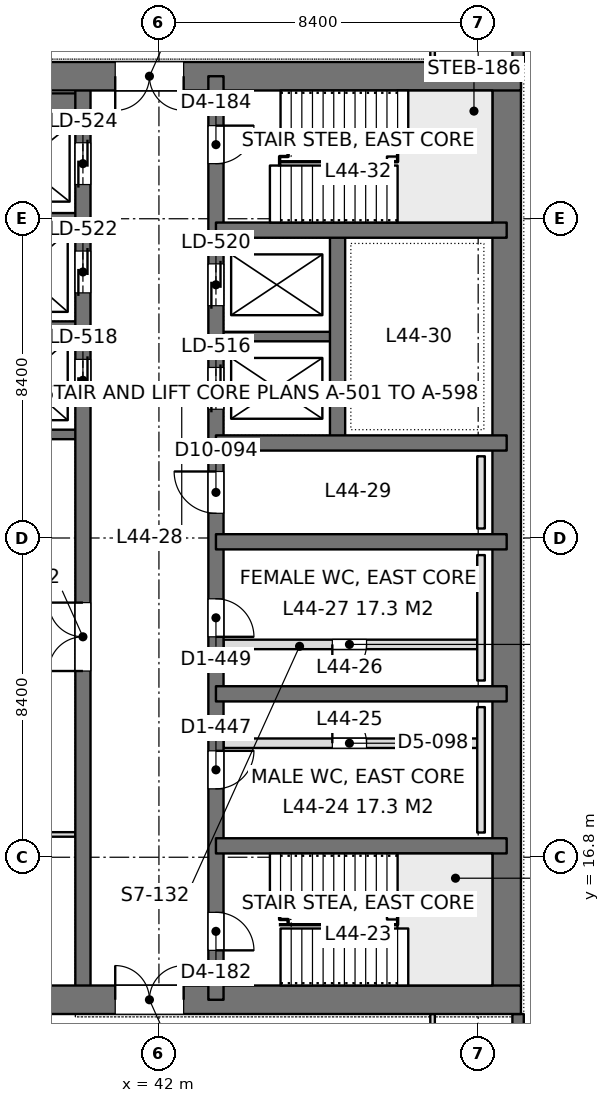
"""IFC4 building model, lengths in metres.
Left out: names, types, materials, properties, quantities, classifications, styles, units other than length and angle.
Written with IfcOpenShell. Run it as: python <this file> out.ifc"""

import sys

from ifc_helpers import new_model, si_unit, direction, frame, frame_2d, origin, place, context, subcontext, project, spatial, rectangle, extrude, element, fill, save


model = new_model("IFC4")
c1 = context("Model", 3, precision=1e-05, world=origin(), true_north=direction((0.0, 1.0)))
c2 = subcontext(c1, "Body", "Model", "MODEL_VIEW")
j1 = project(units=[si_unit("LENGTHUNIT", "METRE"), si_unit("PLANEANGLEUNIT", "RADIAN")], contexts=[c1])
p1 = place(None, origin())
s1 = spatial("IfcSite", under=j1, at=p1, CompositionType="ELEMENT")
p2 = place(p1, origin())
s2 = spatial("IfcBuilding", under=s1, at=p2, CompositionType="ELEMENT")
p3 = place(p2, frame((0.0, 0.0, 194.4)))
s3 = spatial("IfcBuildingStorey", under=s2, at=p3, CompositionType="ELEMENT", Elevation=194.4)
p4 = place(p3, frame((33.675, 13.05, 0.0), z_axis=(0.0, 0.0, 1.0), x_axis=(1.0, 0.0, 0.0)))
e1 = element("IfcWall", 1, at=p4, inside=s3, PredefinedType="SHEAR", context=c2, shape_type="SweptSolid", body=[
    extrude(rectangle(XDim=17.85, YDim=0.75, at=frame_2d((8.925, 0.0))), origin(), (0.0, 0.0, 1.0), 4.2),
])
p5 = place(p4, frame((7.175, 0.0, 0.0)))
e2 = element("IfcOpeningElement", 2, at=p5, cuts=e1, PredefinedType="OPENING", context=c2, shape_type="SweptSolid", body=[
    extrude(rectangle(XDim=1.8, YDim=2.4, at=frame_2d((0.9, 1.2))), frame((0.0, 0.385, 0.0), z_axis=(0.0, -1.0, 0.0), x_axis=(1.0, 0.0, 0.0)), (0.0, 0.0, 1.0), 0.77),
])
p6 = place(p3, frame((33.675, 37.35, 0.0), z_axis=(0.0, 0.0, 1.0), x_axis=(1.0, 0.0, 0.0)))
e3 = element("IfcWall", 3, at=p6, inside=s3, PredefinedType="SHEAR", context=c2, shape_type="SweptSolid", body=[
    extrude(rectangle(XDim=17.85, YDim=0.75, at=frame_2d((8.925, 0.0))), origin(), (0.0, 0.0, 1.0), 4.2),
])
p7 = place(p6, frame((7.175, 0.0, 0.0)))
e4 = element("IfcOpeningElement", 4, at=p7, cuts=e3, PredefinedType="OPENING", context=c2, shape_type="SweptSolid", body=[
    extrude(rectangle(XDim=1.8, YDim=2.4, at=frame_2d((0.9, 1.2))), frame((0.0, 0.385, 0.0), z_axis=(0.0, -1.0, 0.0), x_axis=(1.0, 0.0, 0.0)), (0.0, 0.0, 1.0), 0.77),
])
p8 = place(p3, frame((51.15, 13.05, 0.0), z_axis=(0.0, 0.0, 1.0), x_axis=(0.0, 1.0, 0.0)))
e5 = element("IfcWall", 5, at=p8, inside=s3, PredefinedType="SHEAR", context=c2, shape_type="SweptSolid", body=[
    extrude(rectangle(XDim=24.3, YDim=0.75, at=frame_2d((12.15, 0.0))), origin(), (0.0, 0.0, 1.0), 4.2),
])
p9 = place(p3, frame((43.5, 13.05, 0.0), z_axis=(0.0, 0.0, 1.0), x_axis=(0.0, 1.0, 0.0)))
e6 = element("IfcWall", 6, at=p9, inside=s3, PredefinedType="SHEAR", context=c2, shape_type="SweptSolid", body=[
    extrude(rectangle(XDim=24.3, YDim=0.4, at=frame_2d((12.15, 0.0))), origin(), (0.0, 0.0, 1.0), 4.2),
])
p10 = place(p9, frame((1.3, 0.0, 0.0)))
e7 = element("IfcOpeningElement", 7, at=p10, cuts=e6, PredefinedType="OPENING", context=c2, shape_type="SweptSolid", body=[
    extrude(rectangle(XDim=1.0, YDim=2.2, at=frame_2d((0.5, 1.1))), frame((0.0, 0.21, 0.0), z_axis=(0.0, -1.0, 0.0), x_axis=(1.0, 0.0, 0.0)), (0.0, 0.0, 1.0), 0.42),
])
p11 = place(p9, frame((22.0, 0.0, 0.0)))
e8 = element("IfcOpeningElement", 8, at=p11, cuts=e6, PredefinedType="OPENING", context=c2, shape_type="SweptSolid", body=[
    extrude(rectangle(XDim=1.0, YDim=2.2, at=frame_2d((0.5, 1.1))), frame((0.0, 0.21, 0.0), z_axis=(0.0, -1.0, 0.0), x_axis=(1.0, 0.0, 0.0)), (0.0, 0.0, 1.0), 0.42),
])
p12 = place(p9, frame((5.55, 0.0, 0.0)))
e9 = element("IfcOpeningElement", 9, at=p12, cuts=e6, PredefinedType="OPENING", context=c2, shape_type="SweptSolid", body=[
    extrude(rectangle(XDim=1.0, YDim=2.2, at=frame_2d((0.5, 1.1))), frame((0.0, 0.21, 0.0), z_axis=(0.0, -1.0, 0.0), x_axis=(1.0, 0.0, 0.0)), (0.0, 0.0, 1.0), 0.42),
])
p13 = place(p9, frame((9.55, 0.0, 0.0)))
e10 = element("IfcOpeningElement", 10, at=p13, cuts=e6, PredefinedType="OPENING", context=c2, shape_type="SweptSolid", body=[
    extrude(rectangle(XDim=1.0, YDim=2.2, at=frame_2d((0.5, 1.1))), frame((0.0, 0.21, 0.0), z_axis=(0.0, -1.0, 0.0), x_axis=(1.0, 0.0, 0.0)), (0.0, 0.0, 1.0), 0.42),
])
p14 = place(p9, frame((12.8, 0.0, 0.0)))
e11 = element("IfcOpeningElement", 11, at=p14, cuts=e6, PredefinedType="OPENING", context=c2, shape_type="SweptSolid", body=[
    extrude(rectangle(XDim=1.1, YDim=2.2, at=frame_2d((0.55, 1.1))), frame((0.0, 0.21, 0.0), z_axis=(0.0, -1.0, 0.0), x_axis=(1.0, 0.0, 0.0)), (0.0, 0.0, 1.0), 0.42),
])
p15 = place(p9, frame((15.538, 0.0, 0.0)))
e12 = element("IfcOpeningElement", 12, at=p15, cuts=e6, PredefinedType="OPENING", context=c2, shape_type="SweptSolid", body=[
    extrude(rectangle(XDim=1.1, YDim=2.2, at=frame_2d((0.55, 1.1))), frame((0.0, 0.21, 0.0), z_axis=(0.0, -1.0, 0.0), x_axis=(1.0, 0.0, 0.0)), (0.0, 0.0, 1.0), 0.42),
])
p16 = place(p9, frame((18.262, 0.0, 0.0)))
e13 = element("IfcOpeningElement", 13, at=p16, cuts=e6, PredefinedType="OPENING", context=c2, shape_type="SweptSolid", body=[
    extrude(rectangle(XDim=1.1, YDim=2.2, at=frame_2d((0.55, 1.1))), frame((0.0, 0.21, 0.0), z_axis=(0.0, -1.0, 0.0), x_axis=(1.0, 0.0, 0.0)), (0.0, 0.0, 1.0), 0.42),
])
p17 = place(p3, frame((40.0, 13.05, 0.0), z_axis=(0.0, 0.0, 1.0), x_axis=(0.0, 1.0, 0.0)))
e14 = element("IfcWall", 14, at=p17, inside=s3, PredefinedType="SHEAR", context=c2, shape_type="SweptSolid", body=[
    extrude(rectangle(XDim=24.3, YDim=0.4, at=frame_2d((12.15, 0.0))), origin(), (0.0, 0.0, 1.0), 4.2),
])
p18 = place(p17, frame((15.75, 0.0, 0.0)))
e15 = element("IfcOpeningElement", 15, at=p18, cuts=e14, PredefinedType="OPENING", context=c2, shape_type="SweptSolid", body=[
    extrude(rectangle(XDim=1.1, YDim=2.2, at=frame_2d((0.55, 1.1))), frame((0.0, 0.21, 0.0), z_axis=(0.0, -1.0, 0.0), x_axis=(1.0, 0.0, 0.0)), (0.0, 0.0, 1.0), 0.42),
])
p19 = place(p17, frame((18.6, 0.0, 0.0)))
e16 = element("IfcOpeningElement", 16, at=p19, cuts=e14, PredefinedType="OPENING", context=c2, shape_type="SweptSolid", body=[
    extrude(rectangle(XDim=1.1, YDim=2.2, at=frame_2d((0.55, 1.1))), frame((0.0, 0.21, 0.0), z_axis=(0.0, -1.0, 0.0), x_axis=(1.0, 0.0, 0.0)), (0.0, 0.0, 1.0), 0.42),
])
p20 = place(p17, frame((21.45, 0.0, 0.0)))
e17 = element("IfcOpeningElement", 17, at=p20, cuts=e14, PredefinedType="OPENING", context=c2, shape_type="SweptSolid", body=[
    extrude(rectangle(XDim=1.1, YDim=2.2, at=frame_2d((0.55, 1.1))), frame((0.0, 0.21, 0.0), z_axis=(0.0, -1.0, 0.0), x_axis=(1.0, 0.0, 0.0)), (0.0, 0.0, 1.0), 0.42),
])
p21 = place(p17, frame((8.65, 0.0, 0.0)))
e18 = element("IfcOpeningElement", 18, at=p21, cuts=e14, PredefinedType="OPENING", context=c2, shape_type="SweptSolid", body=[
    extrude(rectangle(XDim=1.8, YDim=2.4, at=frame_2d((0.9, 1.2))), frame((0.0, 0.21, 0.0), z_axis=(0.0, -1.0, 0.0), x_axis=(1.0, 0.0, 0.0)), (0.0, 0.0, 1.0), 0.42),
])
for number, where, z_axis, x_axis in (
    (19, (51.15, 17.1, 0.0), (0.0, 0.0, 1.0), (-1.0, 0.0, 0.0)),
    (20, (51.15, 21.1, 0.0), (0.0, 0.0, 1.0), (-1.0, 0.0, 0.0)),
    (21, (51.15, 25.1, 0.0), (0.0, 0.0, 1.0), (-1.0, 0.0, 0.0)),
    (22, (51.15, 27.7, 0.0), (0.0, 0.0, 1.0), (-1.0, 0.0, 0.0)),
    (23, (51.15, 33.3, 0.0), (0.0, 0.0, 1.0), (-1.0, 0.0, 0.0)),
):
    element("IfcWall", number, at=place(p3, frame(where, z_axis=z_axis, x_axis=x_axis)), inside=s3, PredefinedType="SHEAR", context=c2, shape_type="SweptSolid", body=[
        extrude(rectangle(XDim=7.65, YDim=0.4, at=frame_2d((3.825, 0.0))), origin(), (0.0, 0.0, 1.0), 4.2),
    ])
p22 = place(p3, frame((46.7, 27.7, 0.0), z_axis=(0.0, 0.0, 1.0), x_axis=(0.0, 1.0, 0.0)))
e24 = element("IfcWall", 24, at=p22, inside=s3, PredefinedType="SHEAR", context=c2, shape_type="SweptSolid", body=[
    extrude(rectangle(XDim=5.6, YDim=0.4, at=frame_2d((2.8, 0.0))), origin(), (0.0, 0.0, 1.0), 4.2),
])
p23 = place(p3, frame((46.7, 30.5, 0.0), z_axis=(0.0, 0.0, 1.0), x_axis=(-1.0, 0.0, 0.0)))
e25 = element("IfcWall", 25, at=p23, inside=s3, PredefinedType="SHEAR", context=c2, shape_type="SweptSolid", body=[
    extrude(rectangle(XDim=3.2, YDim=0.25, at=frame_2d((1.6, 0.0))), origin(), (0.0, 0.0, 1.0), 4.2),
])
p24 = place(p3, frame((40.0, 27.925, 0.0), z_axis=(0.0, 0.0, 1.0), x_axis=(-1.0, 0.0, 0.0)))
e26 = element("IfcWall", 26, at=p24, inside=s3, PredefinedType="SHEAR", context=c2, shape_type="SweptSolid", body=[
    extrude(rectangle(XDim=5.95, YDim=0.25, at=frame_2d((2.975, 0.0))), origin(), (0.0, 0.0, 1.0), 4.2),
])
for number, where, z_axis, x_axis in (
    (27, (40.0, 30.775, 0.0), (0.0, 0.0, 1.0), (-1.0, 0.0, 0.0)),
    (28, (40.0, 33.625, 0.0), (0.0, 0.0, 1.0), (-1.0, 0.0, 0.0)),
):
    element("IfcWall", number, at=place(p3, frame(where, z_axis=z_axis, x_axis=x_axis)), inside=s3, PredefinedType="SHEAR", context=c2, shape_type="SweptSolid", body=[
        extrude(rectangle(XDim=3.2, YDim=0.25, at=frame_2d((1.6, 0.0))), origin(), (0.0, 0.0, 1.0), 4.2),
    ])
p25 = place(p3, frame((40.0, 36.625, 0.0), z_axis=(0.0, 0.0, 1.0), x_axis=(-1.0, 0.0, 0.0)))
e29 = element("IfcWall", 29, at=p25, inside=s3, PredefinedType="SHEAR", context=c2, shape_type="SweptSolid", body=[
    extrude(rectangle(XDim=3.2, YDim=0.55, at=frame_2d((1.6, 0.0))), origin(), (0.0, 0.0, 1.0), 4.2),
])
p26 = place(p3, frame((51.45, 42.0, 0.0), z_axis=(0.0, 0.0, 1.0), x_axis=(0.0, -1.0, 0.0)))
e30 = element("IfcWall", 30, at=p26, inside=s3, PredefinedType="SOLIDWALL", context=c2, shape_type="SweptSolid", body=[
    extrude(rectangle(XDim=4.275, YDim=0.3, at=frame_2d((2.137, 0.0))), origin(), (0.0, 0.0, 1.0), 4.05),
])
p27 = place(p26, frame((0.938, 0.0, 0.9)))
e31 = element("IfcOpeningElement", 31, at=p27, cuts=e30, PredefinedType="OPENING", context=c2, shape_type="SweptSolid", body=[
    extrude(rectangle(XDim=2.4, YDim=1.9, at=frame_2d((1.2, 0.95))), frame((0.0, 0.16, 0.0), z_axis=(0.0, -1.0, 0.0), x_axis=(1.0, 0.0, 0.0)), (0.0, 0.0, 1.0), 0.32),
])
p28 = place(p3, frame((51.45, 12.675, 0.0), z_axis=(0.0, 0.0, 1.0), x_axis=(0.0, -1.0, 0.0)))
e32 = element("IfcWall", 32, at=p28, inside=s3, PredefinedType="SOLIDWALL", context=c2, shape_type="SweptSolid", body=[
    extrude(rectangle(XDim=4.275, YDim=0.3, at=frame_2d((2.138, 0.0))), origin(), (0.0, 0.0, 1.0), 4.05),
])
p29 = place(p28, frame((0.938, 0.0, 0.9)))
e33 = element("IfcOpeningElement", 33, at=p29, cuts=e32, PredefinedType="OPENING", context=c2, shape_type="SweptSolid", body=[
    extrude(rectangle(XDim=2.4, YDim=1.9, at=frame_2d((1.2, 0.95))), frame((0.0, 0.16, 0.0), z_axis=(0.0, -1.0, 0.0), x_axis=(1.0, 0.0, 0.0)), (0.0, 0.0, 1.0), 0.32),
])
p30 = place(p3, frame((33.898, 17.4, 0.0), z_axis=(0.0, 0.0, 1.0), x_axis=(1.0, 0.0, 0.0)))
e34 = element("IfcWall", 34, at=p30, inside=s3, PredefinedType="PARTITIONING", context=c2, shape_type="SweptSolid", body=[
    extrude(rectangle(XDim=5.904, YDim=0.12, at=frame_2d((2.952, 0.0))), origin(), (0.0, 0.0, 1.0), 3.55),
])
p31 = place(p3, frame((49.2, 10.7, 0.0), z_axis=(0.0, 0.0, 1.0), x_axis=(0.0, 1.0, 0.0)))
e35 = element("IfcWall", 35, at=p31, inside=s3, PredefinedType="PARTITIONING", context=c2, shape_type="SweptSolid", body=[
    extrude(rectangle(XDim=1.976, YDim=0.12, at=frame_2d((0.988, 0.0))), origin(), (0.0, 0.0, 1.0), 4.05),
])
p32 = place(p3, frame((49.2, 37.724, 0.0), z_axis=(0.0, 0.0, 1.0), x_axis=(0.0, 1.0, 0.0)))
e36 = element("IfcWall", 36, at=p32, inside=s3, PredefinedType="PARTITIONING", context=c2, shape_type="SweptSolid", body=[
    extrude(rectangle(XDim=1.976, YDim=0.12, at=frame_2d((0.988, 0.0))), origin(), (0.0, 0.0, 1.0), 4.05),
])
p33 = place(p3, frame((43.7, 22.4, 0.0), z_axis=(0.0, 0.0, 1.0), x_axis=(1.0, 0.0, 0.0)))
e37 = element("IfcWall", 37, at=p33, inside=s3, PredefinedType="PARTITIONING", context=c2, shape_type="SweptSolid", body=[
    extrude(rectangle(XDim=6.675, YDim=0.25, at=frame_2d((3.337, 0.0))), origin(), (0.0, 0.0, 1.0), 4.0),
])
p34 = place(p33, frame((2.863, 0.0, 0.0)))
e38 = element("IfcOpeningElement", 38, at=p34, cuts=e37, PredefinedType="OPENING", context=c2, shape_type="SweptSolid", body=[
    extrude(rectangle(XDim=0.9, YDim=2.2, at=frame_2d((0.45, 1.1))), frame((0.0, 0.135, 0.0), z_axis=(0.0, -1.0, 0.0), x_axis=(1.0, 0.0, 0.0)), (0.0, 0.0, 1.0), 0.27),
])
p35 = place(p3, frame((43.7, 19.8, 0.0), z_axis=(0.0, 0.0, 1.0), x_axis=(1.0, 0.0, 0.0)))
e39 = element("IfcWall", 39, at=p35, inside=s3, PredefinedType="PARTITIONING", context=c2, shape_type="SweptSolid", body=[
    extrude(rectangle(XDim=6.675, YDim=0.25, at=frame_2d((3.337, 0.0))), origin(), (0.0, 0.0, 1.0), 4.0),
])
p36 = place(p35, frame((2.863, 0.0, 0.0)))
e40 = element("IfcOpeningElement", 40, at=p36, cuts=e39, PredefinedType="OPENING", context=c2, shape_type="SweptSolid", body=[
    extrude(rectangle(XDim=0.9, YDim=2.2, at=frame_2d((0.45, 1.1))), frame((0.0, 0.135, 0.0), z_axis=(0.0, -1.0, 0.0), x_axis=(1.0, 0.0, 0.0)), (0.0, 0.0, 1.0), 0.27),
])
for number, where, z_axis, x_axis in (
    (41, (50.475, 17.45, 0.0), (0.0, 0.0, 1.0), (0.0, 1.0, 0.0)),
    (42, (50.475, 21.45, 0.0), (0.0, 0.0, 1.0), (0.0, 1.0, 0.0)),
):
    element("IfcWall", number, at=place(p3, frame(where, z_axis=z_axis, x_axis=x_axis)), inside=s3, PredefinedType="PLUMBINGWALL", context=c2, shape_type="SweptSolid", body=[
        extrude(rectangle(XDim=3.3, YDim=0.2, at=frame_2d((1.65, 0.0))), origin(), (0.0, 0.0, 1.0), 1.2),
    ])
p37 = place(p3, frame((50.475, 25.45, 0.0), z_axis=(0.0, 0.0, 1.0), x_axis=(0.0, 1.0, 0.0)))
e43 = element("IfcWall", 43, at=p37, inside=s3, PredefinedType="PLUMBINGWALL", context=c2, shape_type="SweptSolid", body=[
    extrude(rectangle(XDim=1.9, YDim=0.2, at=frame_2d((0.95, 0.0))), origin(), (0.0, 0.0, 1.0), 1.2),
])
p38 = place(p5, origin())
e44 = element("IfcDoor", 44, at=p38, inside=s3, OperationType="DOUBLE_DOOR_SINGLE_SWING", PredefinedType="DOOR", context=c2, shape_type="SweptSolid", body=[
    extrude(rectangle(XDim=1.8, YDim=2.4, at=frame_2d((0.9, 1.2))), frame((0.0, 0.025, 0.0), z_axis=(0.0, -1.0, 0.0), x_axis=(1.0, 0.0, 0.0)), (0.0, 0.0, 1.0), 0.05),
])
fill(e2, e44)
p39 = place(p7, frame((1.8, 0.0, 0.0), z_axis=(0.0, 0.0, 1.0), x_axis=(-1.0, 0.0, 0.0)))
e45 = element("IfcDoor", 45, at=p39, inside=s3, OperationType="DOUBLE_DOOR_SINGLE_SWING", PredefinedType="DOOR", context=c2, shape_type="SweptSolid", body=[
    extrude(rectangle(XDim=1.8, YDim=2.4, at=frame_2d((0.9, 1.2))), frame((0.0, 0.025, 0.0), z_axis=(0.0, -1.0, 0.0), x_axis=(1.0, 0.0, 0.0)), (0.0, 0.0, 1.0), 0.05),
])
fill(e4, e45)
p40 = place(p10, frame((1.0, 0.0, 0.0), z_axis=(0.0, 0.0, 1.0), x_axis=(-1.0, 0.0, 0.0)))
e46 = element("IfcDoor", 46, at=p40, inside=s3, OperationType="SINGLE_SWING_RIGHT", PredefinedType="DOOR", context=c2, shape_type="SweptSolid", body=[
    extrude(rectangle(XDim=1.0, YDim=2.2, at=frame_2d((0.5, 1.1))), frame((0.0, 0.025, 0.0), z_axis=(0.0, -1.0, 0.0), x_axis=(1.0, 0.0, 0.0)), (0.0, 0.0, 1.0), 0.05),
])
fill(e7, e46)
p41 = place(p11, frame((1.0, 0.0, 0.0), z_axis=(0.0, 0.0, 1.0), x_axis=(-1.0, 0.0, 0.0)))
e47 = element("IfcDoor", 47, at=p41, inside=s3, OperationType="SINGLE_SWING_LEFT", PredefinedType="DOOR", context=c2, shape_type="SweptSolid", body=[
    extrude(rectangle(XDim=1.0, YDim=2.2, at=frame_2d((0.5, 1.1))), frame((0.0, 0.025, 0.0), z_axis=(0.0, -1.0, 0.0), x_axis=(1.0, 0.0, 0.0)), (0.0, 0.0, 1.0), 0.05),
])
fill(e8, e47)
p42 = place(p12, frame((1.0, 0.0, 0.0), z_axis=(0.0, 0.0, 1.0), x_axis=(-1.0, 0.0, 0.0)))
e48 = element("IfcDoor", 48, at=p42, inside=s3, OperationType="SINGLE_SWING_LEFT", PredefinedType="DOOR", context=c2, shape_type="SweptSolid", body=[
    extrude(rectangle(XDim=1.0, YDim=2.2, at=frame_2d((0.5, 1.1))), frame((0.0, 0.025, 0.0), z_axis=(0.0, -1.0, 0.0), x_axis=(1.0, 0.0, 0.0)), (0.0, 0.0, 1.0), 0.05),
])
fill(e9, e48)
p43 = place(p13, frame((1.0, 0.0, 0.0), z_axis=(0.0, 0.0, 1.0), x_axis=(-1.0, 0.0, 0.0)))
e49 = element("IfcDoor", 49, at=p43, inside=s3, OperationType="SINGLE_SWING_RIGHT", PredefinedType="DOOR", context=c2, shape_type="SweptSolid", body=[
    extrude(rectangle(XDim=1.0, YDim=2.2, at=frame_2d((0.5, 1.1))), frame((0.0, 0.025, 0.0), z_axis=(0.0, -1.0, 0.0), x_axis=(1.0, 0.0, 0.0)), (0.0, 0.0, 1.0), 0.05),
])
fill(e10, e49)
p44 = place(p14, origin())
e50 = element("IfcDoor", 50, at=p44, inside=s3, OperationType="SINGLE_SWING_RIGHT", PredefinedType="DOOR", context=c2, shape_type="SweptSolid", body=[
    extrude(rectangle(XDim=1.1, YDim=2.2, at=frame_2d((0.55, 1.1))), frame((0.0, 0.025, 0.0), z_axis=(0.0, -1.0, 0.0), x_axis=(1.0, 0.0, 0.0)), (0.0, 0.0, 1.0), 0.05),
])
fill(e11, e50)
p45 = place(p18, origin())
e51 = element("IfcDoor", 51, at=p45, inside=s3, OperationType="DOUBLE_DOOR_SLIDING", PredefinedType="DOOR", context=c2, shape_type="SweptSolid", body=[
    extrude(rectangle(XDim=1.1, YDim=2.2, at=frame_2d((0.55, 1.1))), frame((0.0, 0.025, 0.0), z_axis=(0.0, -1.0, 0.0), x_axis=(1.0, 0.0, 0.0)), (0.0, 0.0, 1.0), 0.05),
])
fill(e15, e51)
p46 = place(p19, origin())
e52 = element("IfcDoor", 52, at=p46, inside=s3, OperationType="DOUBLE_DOOR_SLIDING", PredefinedType="DOOR", context=c2, shape_type="SweptSolid", body=[
    extrude(rectangle(XDim=1.1, YDim=2.2, at=frame_2d((0.55, 1.1))), frame((0.0, 0.025, 0.0), z_axis=(0.0, -1.0, 0.0), x_axis=(1.0, 0.0, 0.0)), (0.0, 0.0, 1.0), 0.05),
])
fill(e16, e52)
p47 = place(p20, origin())
e53 = element("IfcDoor", 53, at=p47, inside=s3, OperationType="DOUBLE_DOOR_SLIDING", PredefinedType="DOOR", context=c2, shape_type="SweptSolid", body=[
    extrude(rectangle(XDim=1.1, YDim=2.2, at=frame_2d((0.55, 1.1))), frame((0.0, 0.025, 0.0), z_axis=(0.0, -1.0, 0.0), x_axis=(1.0, 0.0, 0.0)), (0.0, 0.0, 1.0), 0.05),
])
fill(e17, e53)
p48 = place(p15, origin())
e54 = element("IfcDoor", 54, at=p48, inside=s3, OperationType="DOUBLE_DOOR_SLIDING", PredefinedType="DOOR", context=c2, shape_type="SweptSolid", body=[
    extrude(rectangle(XDim=1.1, YDim=2.2, at=frame_2d((0.55, 1.1))), frame((0.0, 0.025, 0.0), z_axis=(0.0, -1.0, 0.0), x_axis=(1.0, 0.0, 0.0)), (0.0, 0.0, 1.0), 0.05),
])
fill(e12, e54)
p49 = place(p16, origin())
e55 = element("IfcDoor", 55, at=p49, inside=s3, OperationType="DOUBLE_DOOR_SLIDING", PredefinedType="DOOR", context=c2, shape_type="SweptSolid", body=[
    extrude(rectangle(XDim=1.1, YDim=2.2, at=frame_2d((0.55, 1.1))), frame((0.0, 0.025, 0.0), z_axis=(0.0, -1.0, 0.0), x_axis=(1.0, 0.0, 0.0)), (0.0, 0.0, 1.0), 0.05),
])
fill(e13, e55)
p50 = place(p21, origin())
e56 = element("IfcDoor", 56, at=p50, inside=s3, OperationType="DOUBLE_DOOR_SINGLE_SWING", PredefinedType="DOOR", context=c2, shape_type="SweptSolid", body=[
    extrude(rectangle(XDim=1.8, YDim=2.4, at=frame_2d((0.9, 1.2))), frame((0.0, 0.025, 0.0), z_axis=(0.0, -1.0, 0.0), x_axis=(1.0, 0.0, 0.0)), (0.0, 0.0, 1.0), 0.05),
])
fill(e18, e56)
p51 = place(p34, frame((0.9, 0.0, 0.0), z_axis=(0.0, 0.0, 1.0), x_axis=(-1.0, 0.0, 0.0)))
e57 = element("IfcDoor", 57, at=p51, inside=s3, OperationType="SINGLE_SWING_RIGHT", PredefinedType="DOOR", context=c2, shape_type="SweptSolid", body=[
    extrude(rectangle(XDim=0.9, YDim=2.2, at=frame_2d((0.45, 1.1))), frame((0.0, 0.025, 0.0), z_axis=(0.0, -1.0, 0.0), x_axis=(1.0, 0.0, 0.0)), (0.0, 0.0, 1.0), 0.05),
])
fill(e38, e57)
p52 = place(p36, origin())
e58 = element("IfcDoor", 58, at=p52, inside=s3, OperationType="SINGLE_SWING_LEFT", PredefinedType="DOOR", context=c2, shape_type="SweptSolid", body=[
    extrude(rectangle(XDim=0.9, YDim=2.2, at=frame_2d((0.45, 1.1))), frame((0.0, 0.025, 0.0), z_axis=(0.0, -1.0, 0.0), x_axis=(1.0, 0.0, 0.0)), (0.0, 0.0, 1.0), 0.05),
])
fill(e40, e58)
save(model, sys.argv[1])
